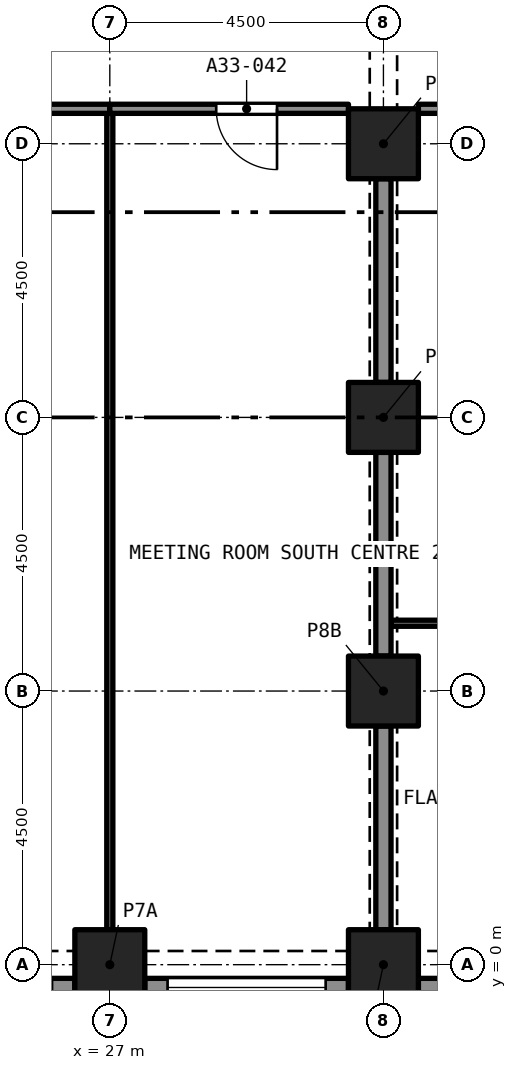
"""IFC4 building model, lengths in metres.
Left out: names, types, materials, properties, quantities, classifications, styles, units other than length and angle.
Written with IfcOpenShell. Run it as: python <this file> out.ifc"""

import sys

from ifc_helpers import new_model, si_unit, direction, frame, frame_2d, origin, origin_2d, place, context, subcontext, project, spatial, rectangle, extrude, element, fill, save


model = new_model("IFC4")
c1 = context("Model", 3, precision=1e-05, world=origin(), true_north=direction((0.0, 1.0)))
c2 = subcontext(c1, "Body", "Model", "MODEL_VIEW")
j1 = project(units=[si_unit("LENGTHUNIT", "METRE"), si_unit("PLANEANGLEUNIT", "RADIAN")], contexts=[c1])
p1 = place(None, origin())
s1 = spatial("IfcSite", under=j1, at=p1, CompositionType="ELEMENT")
p2 = place(p1, origin())
s2 = spatial("IfcBuilding", under=s1, at=p2, CompositionType="ELEMENT")
p3 = place(p2, frame((0.0, 0.0, 118.4)))
s3 = spatial("IfcBuildingStorey", under=s2, at=p3, CompositionType="ELEMENT", Elevation=118.4)
for number, where, z_axis, x_axis in (
    (1, (27.0, 0.0, 0.0), (0.0, 0.0, 1.0), (1.0, 0.0, 0.0)),
    (2, (31.5, 0.0, 0.0), (0.0, 0.0, 1.0), (1.0, 0.0, 0.0)),
    (3, (31.5, 4.5, 0.0), (0.0, 0.0, 1.0), (1.0, 0.0, 0.0)),
    (4, (31.5, 9.0, 0.0), (0.0, 0.0, 1.0), (1.0, 0.0, 0.0)),
    (5, (31.5, 13.5, 0.0), (0.0, 0.0, 1.0), (1.0, 0.0, 0.0)),
):
    element("IfcColumn", number, at=place(p3, frame(where, z_axis=z_axis, x_axis=x_axis)), inside=s3, PredefinedType="COLUMN", context=c2, shape_type="SweptSolid", body=[
        extrude(rectangle(XDim=1.15, YDim=1.15, at=origin_2d()), origin(), (0.0, 0.0, 1.0), 3.2),
    ])
p4 = place(p3, frame((26.425, -0.375, 0.0), z_axis=(0.0, 0.0, 1.0), x_axis=(-1.0, 0.0, 0.0)))
e6 = element("IfcWall", 6, at=p4, inside=s3, PredefinedType="SOLIDWALL", context=c2, shape_type="SweptSolid", body=[
    extrude(rectangle(XDim=3.35, YDim=0.3, at=frame_2d((1.675, 0.0))), origin(), (0.0, 0.0, 1.0), 3.2),
])
p5 = place(p4, frame((0.375, 0.0, 0.45)))
e7 = element("IfcOpeningElement", 7, at=p5, cuts=e6, PredefinedType="OPENING", context=c2, shape_type="SweptSolid", body=[
    extrude(rectangle(XDim=2.6, YDim=1.95, at=frame_2d((1.3, 0.975))), frame((0.0, 0.16, 0.0), z_axis=(0.0, -1.0, 0.0), x_axis=(1.0, 0.0, 0.0)), (0.0, 0.0, 1.0), 0.32),
])
p6 = place(p3, frame((30.925, -0.375, 0.0), z_axis=(0.0, 0.0, 1.0), x_axis=(-1.0, 0.0, 0.0)))
e8 = element("IfcWall", 8, at=p6, inside=s3, PredefinedType="SOLIDWALL", context=c2, shape_type="SweptSolid", body=[
    extrude(rectangle(XDim=3.35, YDim=0.3, at=frame_2d((1.675, 0.0))), origin(), (0.0, 0.0, 1.0), 3.2),
])
p7 = place(p6, frame((0.375, 0.0, 0.45)))
e9 = element("IfcOpeningElement", 9, at=p7, cuts=e8, PredefinedType="OPENING", context=c2, shape_type="SweptSolid", body=[
    extrude(rectangle(XDim=2.6, YDim=1.95, at=frame_2d((1.3, 0.975))), frame((0.0, 0.16, 0.0), z_axis=(0.0, -1.0, 0.0), x_axis=(1.0, 0.0, 0.0)), (0.0, 0.0, 1.0), 0.32),
])
p8 = place(p3, frame((35.425, -0.375, 0.0), z_axis=(0.0, 0.0, 1.0), x_axis=(-1.0, 0.0, 0.0)))
e10 = element("IfcWall", 10, at=p8, inside=s3, PredefinedType="SOLIDWALL", context=c2, shape_type="SweptSolid", body=[
    extrude(rectangle(XDim=3.35, YDim=0.3, at=frame_2d((1.675, 0.0))), origin(), (0.0, 0.0, 1.0), 3.2),
])
p9 = place(p8, frame((0.375, 0.0, 0.45)))
e11 = element("IfcOpeningElement", 11, at=p9, cuts=e10, PredefinedType="OPENING", context=c2, shape_type="SweptSolid", body=[
    extrude(rectangle(XDim=2.6, YDim=1.95, at=frame_2d((1.3, 0.975))), frame((0.0, 0.16, 0.0), z_axis=(0.0, -1.0, 0.0), x_axis=(1.0, 0.0, 0.0)), (0.0, 0.0, 1.0), 0.32),
])
p10 = place(p3, frame((36.0, 5.615, 0.0), z_axis=(0.0, 0.0, 1.0), x_axis=(-1.0, 0.0, 0.0)))
e12 = element("IfcWall", 12, at=p10, inside=s3, PredefinedType="PARTITIONING", context=c2, shape_type="SweptSolid", body=[
    extrude(rectangle(XDim=4.375, YDim=0.1, at=frame_2d((2.188, 0.0))), origin(), (0.0, 0.0, 1.0), 2.9),
])
p11 = place(p10, frame((1.75, 0.0, 0.0)))
e13 = element("IfcOpeningElement", 13, at=p11, cuts=e12, PredefinedType="OPENING", context=c2, shape_type="SweptSolid", body=[
    extrude(rectangle(XDim=1.0, YDim=2.1, at=frame_2d((0.5, 1.05))), frame((0.0, 0.06, 0.0), z_axis=(0.0, -1.0, 0.0), x_axis=(1.0, 0.0, 0.0)), (0.0, 0.0, 1.0), 0.12),
])
p12 = place(p3, frame((31.5, 9.575, 0.0), z_axis=(0.0, 0.0, 1.0), x_axis=(0.0, 1.0, 0.0)))
e14 = element("IfcWall", 14, at=p12, inside=s3, PredefinedType="PARTITIONING", context=c2, shape_type="SweptSolid", body=[
    extrude(rectangle(XDim=3.35, YDim=0.25, at=frame_2d((1.675, 0.0))), origin(), (0.0, 0.0, 1.0), 2.38),
])
p13 = place(p3, frame((34.425, 14.075, 0.0), z_axis=(0.0, 0.0, 1.0), x_axis=(-1.0, 0.0, 0.0)))
e15 = element("IfcWall", 15, at=p13, inside=s3, PredefinedType="PARTITIONING", context=c2, shape_type="SweptSolid", body=[
    extrude(rectangle(XDim=2.35, YDim=0.15, at=frame_2d((1.175, 0.0))), origin(), (0.0, 0.0, 1.0), 2.9),
])
p14 = place(p13, frame((0.175, 0.0, 0.0)))
e16 = element("IfcOpeningElement", 16, at=p14, cuts=e15, PredefinedType="OPENING", context=c2, shape_type="SweptSolid", body=[
    extrude(rectangle(XDim=1.0, YDim=2.1, at=frame_2d((0.5, 1.05))), frame((0.0, 0.085, 0.0), z_axis=(0.0, -1.0, 0.0), x_axis=(1.0, 0.0, 0.0)), (0.0, 0.0, 1.0), 0.17),
])
for number, where, z_axis, x_axis in (
    (17, (31.5, 0.575, 0.0), (0.0, 0.0, 1.0), (0.0, 1.0, 0.0)),
    (18, (31.5, 5.075, 0.0), (0.0, 0.0, 1.0), (0.0, 1.0, 0.0)),
):
    element("IfcWall", number, at=place(p3, frame(where, z_axis=z_axis, x_axis=x_axis)), inside=s3, PredefinedType="PARTITIONING", context=c2, shape_type="SweptSolid", body=[
        extrude(rectangle(XDim=3.35, YDim=0.25, at=frame_2d((1.675, 0.0))), origin(), (0.0, 0.0, 1.0), 2.38),
    ])
p15 = place(p3, frame((27.0, 0.575, 0.0), z_axis=(0.0, 0.0, 1.0), x_axis=(0.0, 1.0, 0.0)))
e19 = element("IfcWall", 19, at=p15, inside=s3, PredefinedType="PARTITIONING", context=c2, shape_type="SweptSolid", body=[
    extrude(rectangle(XDim=13.425, YDim=0.1, at=frame_2d((6.712, 0.0))), origin(), (0.0, 0.0, 1.0), 2.75),
])
p16 = place(p3, frame((27.0, 14.075, 0.0), z_axis=(0.0, 0.0, 1.0), x_axis=(-1.0, 0.0, 0.0)))
e20 = element("IfcWall", 20, at=p16, inside=s3, PredefinedType="PARTITIONING", context=c2, shape_type="SweptSolid", body=[
    extrude(rectangle(XDim=4.5, YDim=0.15, at=frame_2d((2.25, 0.0))), origin(), (0.0, 0.0, 1.0), 2.75),
])
p17 = place(p16, frame((1.75, 0.0, 0.0)))
e21 = element("IfcOpeningElement", 21, at=p17, cuts=e20, PredefinedType="OPENING", context=c2, shape_type="SweptSolid", body=[
    extrude(rectangle(XDim=1.0, YDim=2.1, at=frame_2d((0.5, 1.05))), frame((0.0, 0.085, 0.0), z_axis=(0.0, -1.0, 0.0), x_axis=(1.0, 0.0, 0.0)), (0.0, 0.0, 1.0), 0.17),
])
p18 = place(p3, frame((30.925, 14.075, 0.0), z_axis=(0.0, 0.0, 1.0), x_axis=(-1.0, 0.0, 0.0)))
e22 = element("IfcWall", 22, at=p18, inside=s3, PredefinedType="PARTITIONING", context=c2, shape_type="SweptSolid", body=[
    extrude(rectangle(XDim=3.925, YDim=0.15, at=frame_2d((1.962, 0.0))), origin(), (0.0, 0.0, 1.0), 2.75),
])
p19 = place(p18, frame((1.175, 0.0, 0.0)))
e23 = element("IfcOpeningElement", 23, at=p19, cuts=e22, PredefinedType="OPENING", context=c2, shape_type="SweptSolid", body=[
    extrude(rectangle(XDim=1.0, YDim=2.1, at=frame_2d((0.5, 1.05))), frame((0.0, 0.085, 0.0), z_axis=(0.0, -1.0, 0.0), x_axis=(1.0, 0.0, 0.0)), (0.0, 0.0, 1.0), 0.17),
])
p20 = place(p7, origin())
e24 = element("IfcWindow", 24, at=p20, inside=s3, PartitioningType="SINGLE_PANEL", PredefinedType="WINDOW", context=c2, shape_type="SweptSolid", body=[
    extrude(rectangle(XDim=2.6, YDim=1.95, at=frame_2d((1.3, 0.975))), frame((0.0, 0.03, 0.0), z_axis=(0.0, -1.0, 0.0), x_axis=(1.0, 0.0, 0.0)), (0.0, 0.0, 1.0), 0.06),
])
fill(e9, e24)
p21 = place(p19, origin())
e25 = element("IfcDoor", 25, at=p21, inside=s3, OperationType="SINGLE_SWING_LEFT", PredefinedType="DOOR", context=c2, shape_type="SweptSolid", body=[
    extrude(rectangle(XDim=1.0, YDim=2.1, at=frame_2d((0.5, 1.05))), frame((0.0, 0.025, 0.0), z_axis=(0.0, -1.0, 0.0), x_axis=(1.0, 0.0, 0.0)), (0.0, 0.0, 1.0), 0.05),
])
fill(e23, e25)
save(model, sys.argv[1])
